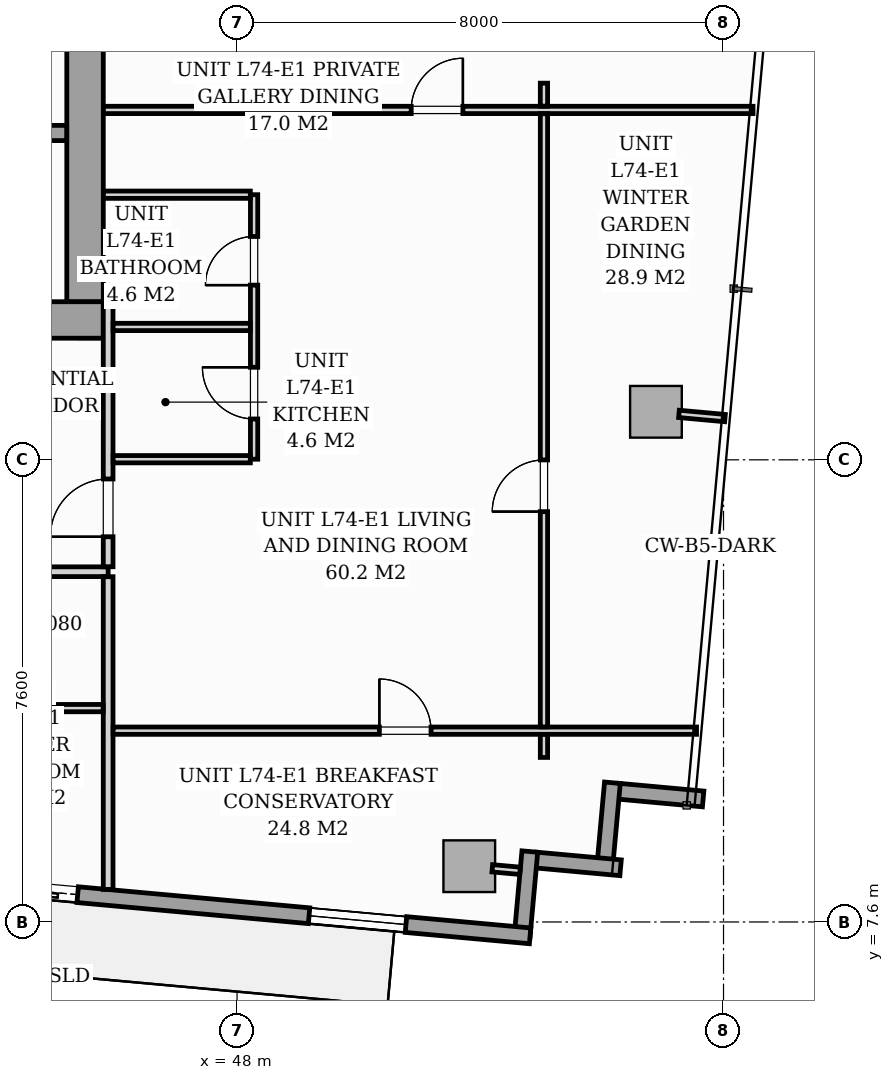
"""IFC4 building model, lengths in metres.
Left out: names, types, materials, properties, quantities, classifications, styles, units other than length and angle.
Written with IfcOpenShell. Run it as: python <this file> out.ifc"""

import sys

from ifc_helpers import new_model, si_unit, direction, frame, frame_2d, origin, origin_2d, place, context, subcontext, project, spatial, rectangle, i_section, extrude, source, transform, mapped, element, fill, save


model = new_model("IFC4")
c1 = context("Model", 3, precision=1e-05, world=origin(), true_north=direction((0.0, 1.0)))
c2 = subcontext(c1, "Body", "Model", "MODEL_VIEW")
j1 = project(units=[si_unit("LENGTHUNIT", "METRE"), si_unit("PLANEANGLEUNIT", "RADIAN")], contexts=[c1])
p1 = place(None, origin())
s1 = spatial("IfcSite", under=j1, at=p1, CompositionType="ELEMENT")
p2 = place(p1, origin())
s2 = spatial("IfcBuilding", under=s1, at=p2, CompositionType="ELEMENT")
p3 = place(p2, frame((0.0, 0.0, 256.2)))
s3 = spatial("IfcBuildingStorey", under=s2, at=p3, CompositionType="ELEMENT", Elevation=256.2)
m1 = source(origin(), c2, "Body", "SweptSolid", [
    extrude(i_section(OverallWidth=0.409, OverallDepth=0.425, WebThickness=0.033, FlangeThickness=0.052, FilletRadius=0.018, at=origin_2d()), origin(), (0.0, 0.0, 1.0), 3.296),
])
p4 = place(p3, frame((45.6, 17.4, 0.002), z_axis=(0.0, 0.0, 1.0), x_axis=(1.0, 0.0, 0.0)))
e1 = element("IfcColumn", 1, at=p4, inside=s3, PredefinedType="PILASTER", context=c2, shape_type="MappedRepresentation", body=[
    mapped(m1, transform((0.0, 0.0, 0.0), scale=1.0)),
])
m2 = source(origin(), c2, "Body", "SweptSolid", [
    extrude(rectangle(XDim=0.85, YDim=0.85, at=origin_2d()), origin(), (0.0, 0.0, 1.0), 3.294),
])
for number, where, z_axis, x_axis in (
    (2, (51.819, 8.517, 0.002), (0.0, 0.0, 1.0), (0.996, -0.091, 0.0)),
    (3, (54.889, 15.99, 0.002), (0.0, 0.0, 1.0), (0.996, -0.091, 0.0)),
):
    element("IfcColumn", number, at=place(p3, frame(where, z_axis=z_axis, x_axis=x_axis)), inside=s3, PredefinedType="COLUMN", context=c2, shape_type="MappedRepresentation", body=[
        mapped(m2, transform((0.0, 0.0, 0.0), scale=1.0)),
    ])
for number, where, z_axis, x_axis in (
    (4, (55.665, 9.623, 0.0), (0.0, 0.0, 1.0), (-0.996, 0.091, 0.0)),
    (5, (54.173, 9.889, 0.0), (0.0, 0.0, 1.0), (-0.091, -0.996, 0.0)),
):
    element("IfcWall", number, at=place(p3, frame(where, z_axis=z_axis, x_axis=x_axis)), inside=s3, PredefinedType="STANDARD", context=c2, shape_type="SweptSolid", body=[
        extrude(rectangle(XDim=1.395, YDim=0.26, at=frame_2d((0.698, 0.0))), origin(), (0.0, 0.0, 1.0), 3.0),
    ])
for number, where, z_axis, x_axis in (
    (6, (54.307, 8.492, 0.0), (0.0, 0.0, 1.0), (-0.996, 0.091, 0.0)),
    (7, (52.815, 8.758, 0.0), (0.0, 0.0, 1.0), (-0.091, -0.996, 0.0)),
):
    element("IfcWall", number, at=place(p3, frame(where, z_axis=z_axis, x_axis=x_axis)), inside=s3, PredefinedType="STANDARD", context=c2, shape_type="SweptSolid", body=[
        extrude(rectangle(XDim=1.395, YDim=0.26, at=frame_2d((0.698, 0.0))), origin(), (0.0, 0.0, 1.0), 3.0),
    ])
p5 = place(p3, frame((52.819, 7.372, 0.0), z_axis=(0.0, 0.0, 1.0), x_axis=(-0.995884447498, 0.090632043071, 0.0)))
e8 = element("IfcWall", 8, at=p5, inside=s3, PredefinedType="STANDARD", context=c2, shape_type="SweptSolid", body=[
    extrude(rectangle(XDim=14.63, YDim=0.26, at=frame_2d((7.315, 0.0))), origin(), (0.0, 0.0, 1.0), 3.0),
])
p6 = place(p5, frame((7.471, 0.0, 0.0)))
e9 = element("IfcOpeningElement", 9, at=p6, cuts=e8, PredefinedType="OPENING", context=c2, shape_type="SweptSolid", body=[
    extrude(rectangle(XDim=1.8, YDim=2.06, at=frame_2d((0.9, 1.03))), frame((0.0, 0.14, 0.0), z_axis=(0.0, -1.0, 0.0), x_axis=(1.0, 0.0, 0.0)), (0.0, 0.0, 1.0), 0.28),
])
p7 = place(p5, frame((2.05, 0.0, 0.65)))
e10 = element("IfcOpeningElement", 10, at=p7, cuts=e8, PredefinedType="OPENING", context=c2, shape_type="SweptSolid", body=[
    extrude(rectangle(XDim=1.6, YDim=1.5, at=frame_2d((0.8, 0.75))), frame((0.0, 0.14, 0.0), z_axis=(0.0, -1.0, 0.0), x_axis=(1.0, 0.0, 0.0)), (0.0, 0.0, 1.0), 0.28),
])
p8 = place(p3, frame((26.2, 17.5, 0.0), z_axis=(0.0, 0.0, 1.0), x_axis=(1.0, 0.0, 0.0)))
e11 = element("IfcWall", 11, at=p8, inside=s3, PredefinedType="SHEAR", context=c2, shape_type="SweptSolid", body=[
    extrude(rectangle(XDim=19.6, YDim=0.6, at=frame_2d((9.8, 0.0))), origin(), (0.0, 0.0, 1.0), 3.3),
])
p9 = place(p8, frame((0.95, 0.0, 0.0)))
e12 = element("IfcOpeningElement", 12, at=p9, cuts=e11, PredefinedType="OPENING", context=c2, shape_type="SweptSolid", body=[
    extrude(rectangle(XDim=0.95, YDim=2.06, at=frame_2d((0.475, 1.03))), frame((0.0, 0.31, 0.0), z_axis=(0.0, -1.0, 0.0), x_axis=(1.0, 0.0, 0.0)), (0.0, 0.0, 1.0), 0.62),
])
p10 = place(p8, frame((9.38, 0.0, 0.0)))
e13 = element("IfcOpeningElement", 13, at=p10, cuts=e11, PredefinedType="OPENING", context=c2, shape_type="SweptSolid", body=[
    extrude(rectangle(XDim=0.85, YDim=2.0, at=frame_2d((0.425, 1.0))), frame((0.0, 0.31, 0.0), z_axis=(0.0, -1.0, 0.0), x_axis=(1.0, 0.0, 0.0)), (0.0, 0.0, 1.0), 0.62),
])
p11 = place(p8, frame((17.55, 0.0, 0.0)))
e14 = element("IfcOpeningElement", 14, at=p11, cuts=e11, PredefinedType="OPENING", context=c2, shape_type="SweptSolid", body=[
    extrude(rectangle(XDim=0.95, YDim=2.06, at=frame_2d((0.475, 1.03))), frame((0.0, 0.31, 0.0), z_axis=(0.0, -1.0, 0.0), x_axis=(1.0, 0.0, 0.0)), (0.0, 0.0, 1.0), 0.62),
])
p12 = place(p3, frame((45.5, 17.802, 0.0), z_axis=(0.0, 0.0, 1.0), x_axis=(0.0, 1.0, 0.0)))
e15 = element("IfcWall", 15, at=p12, inside=s3, PredefinedType="SHEAR", context=c2, shape_type="SweptSolid", body=[
    extrude(rectangle(XDim=5.796, YDim=0.6, at=frame_2d((2.898, 0.0))), origin(), (0.0, 0.0, 1.0), 3.3),
])
p13 = place(p3, frame((37.05, 20.575, 0.0), z_axis=(0.0, 0.0, 1.0), x_axis=(1.0, 0.0, 0.0)))
e16 = element("IfcWall", 16, at=p13, inside=s3, PredefinedType="SOLIDWALL", context=c2, shape_type="SweptSolid", body=[
    extrude(rectangle(XDim=8.148, YDim=0.25, at=frame_2d((4.074, 0.0))), origin(), (0.0, 0.0, 1.0), 3.3),
])
p14 = place(p13, frame((6.6, 0.0, 0.0)))
e17 = element("IfcOpeningElement", 17, at=p14, cuts=e16, PredefinedType="OPENING", context=c2, shape_type="SweptSolid", body=[
    extrude(rectangle(XDim=0.95, YDim=2.06, at=frame_2d((0.475, 1.03))), frame((0.0, 0.135, 0.0), z_axis=(0.0, -1.0, 0.0), x_axis=(1.0, 0.0, 0.0)), (0.0, 0.0, 1.0), 0.27),
])
p15 = place(p3, frame((24.55, 13.36, 0.0), z_axis=(0.0, 0.0, 1.0), x_axis=(1.0, 0.0, 0.0)))
e18 = element("IfcWall", 18, at=p15, inside=s3, PredefinedType="PARTITIONING", context=c2, shape_type="SweptSolid", body=[
    extrude(rectangle(XDim=21.33, YDim=0.16, at=frame_2d((10.665, 0.0))), origin(), (0.0, 0.0, 1.0), 2.51),
])
p16 = place(p15, frame((5.415, 0.0, 0.0)))
e19 = element("IfcOpeningElement", 19, at=p16, cuts=e18, PredefinedType="OPENING", context=c2, shape_type="SweptSolid", body=[
    extrude(rectangle(XDim=0.95, YDim=2.06, at=frame_2d((0.475, 1.03))), frame((0.0, 0.09, 0.0), z_axis=(0.0, -1.0, 0.0), x_axis=(1.0, 0.0, 0.0)), (0.0, 0.0, 1.0), 0.18),
])
p17 = place(p3, frame((45.88, 8.136, 0.0), z_axis=(0.0, 0.0, 1.0), x_axis=(0.0, 1.0, 0.0)))
e20 = element("IfcWall", 20, at=p17, inside=s3, PredefinedType="PARTITIONING", context=c2, shape_type="SweptSolid", body=[
    extrude(rectangle(XDim=5.142, YDim=0.16, at=frame_2d((2.571, 0.0))), origin(), (0.0, 0.0, 1.0), 3.0),
])
p18 = place(p3, frame((45.88, 13.442, 0.0), z_axis=(0.0, 0.0, 1.0), x_axis=(0.0, 1.0, 0.0)))
e21 = element("IfcWall", 21, at=p18, inside=s3, PredefinedType="PARTITIONING", context=c2, shape_type="SweptSolid", body=[
    extrude(rectangle(XDim=4.36, YDim=0.16, at=frame_2d((2.18, 0.0))), origin(), (0.0, 0.0, 1.0), 3.0),
])
p19 = place(p18, frame((0.493, 0.0, 0.0)))
e22 = element("IfcOpeningElement", 22, at=p19, cuts=e21, PredefinedType="OPENING", context=c2, shape_type="SweptSolid", body=[
    extrude(rectangle(XDim=0.95, YDim=2.06, at=frame_2d((0.475, 1.03))), frame((0.0, 0.09, 0.0), z_axis=(0.0, -1.0, 0.0), x_axis=(1.0, 0.0, 0.0)), (0.0, 0.0, 1.0), 0.18),
])
p20 = place(p3, frame((40.262, 11.117, 0.0), z_axis=(0.0, 0.0, 1.0), x_axis=(1.0, 0.0, 0.0)))
e23 = element("IfcWall", 23, at=p20, inside=s3, PredefinedType="PARTITIONING", context=c2, shape_type="SweptSolid", body=[
    extrude(rectangle(XDim=5.536, YDim=0.12, at=frame_2d((2.768, 0.0))), origin(), (0.0, 0.0, 1.0), 3.0),
])
p21 = place(p20, frame((2.528, 0.0, 0.0)))
e24 = element("IfcOpeningElement", 24, at=p21, cuts=e23, PredefinedType="OPENING", context=c2, shape_type="SweptSolid", body=[
    extrude(rectangle(XDim=0.8, YDim=2.02, at=frame_2d((0.4, 1.01))), frame((0.0, 0.07, 0.0), z_axis=(0.0, -1.0, 0.0), x_axis=(1.0, 0.0, 0.0)), (0.0, 0.0, 1.0), 0.14),
])
p22 = place(p3, frame((48.28, 15.21, 0.0), z_axis=(0.0, 0.0, 1.0), x_axis=(0.0, 1.0, 0.0)))
e25 = element("IfcWall", 25, at=p22, inside=s3, PredefinedType="PARTITIONING", context=c2, shape_type="SweptSolid", body=[
    extrude(rectangle(XDim=4.35, YDim=0.12, at=frame_2d((2.175, 0.0))), origin(), (0.0, 0.0, 1.0), 3.0),
])
p23 = place(p22, frame((0.662, 0.0, 0.0)))
e26 = element("IfcOpeningElement", 26, at=p23, cuts=e25, PredefinedType="OPENING", context=c2, shape_type="SweptSolid", body=[
    extrude(rectangle(XDim=0.85, YDim=2.05, at=frame_2d((0.425, 1.025))), frame((0.0, 0.07, 0.0), z_axis=(0.0, -1.0, 0.0), x_axis=(1.0, 0.0, 0.0)), (0.0, 0.0, 1.0), 0.14),
])
p24 = place(p22, frame((2.863, 0.0, 0.0)))
e27 = element("IfcOpeningElement", 27, at=p24, cuts=e25, PredefinedType="OPENING", context=c2, shape_type="SweptSolid", body=[
    extrude(rectangle(XDim=0.8, YDim=2.02, at=frame_2d((0.4, 1.01))), frame((0.0, 0.07, 0.0), z_axis=(0.0, -1.0, 0.0), x_axis=(1.0, 0.0, 0.0)), (0.0, 0.0, 1.0), 0.14),
])
p25 = place(p3, frame((45.962, 17.385, 0.0), z_axis=(0.0, 0.0, 1.0), x_axis=(1.0, 0.0, 0.0)))
e28 = element("IfcWall", 28, at=p25, inside=s3, PredefinedType="PARTITIONING", context=c2, shape_type="SweptSolid", body=[
    extrude(rectangle(XDim=2.256, YDim=0.12, at=frame_2d((1.128, 0.0))), origin(), (0.0, 0.0, 1.0), 2.342),
])
p26 = place(p3, frame((45.962, 15.21, 0.0), z_axis=(0.0, 0.0, 1.0), x_axis=(1.0, 0.0, 0.0)))
e29 = element("IfcWall", 29, at=p26, inside=s3, PredefinedType="PARTITIONING", context=c2, shape_type="SweptSolid", body=[
    extrude(rectangle(XDim=2.256, YDim=0.12, at=frame_2d((1.128, 0.0))), origin(), (0.0, 0.0, 1.0), 3.0),
])
p27 = place(p3, frame((45.802, 19.56, 0.0), z_axis=(0.0, 0.0, 1.0), x_axis=(1.0, 0.0, 0.0)))
e30 = element("IfcWall", 30, at=p27, inside=s3, PredefinedType="PARTITIONING", context=c2, shape_type="SweptSolid", body=[
    extrude(rectangle(XDim=2.416, YDim=0.12, at=frame_2d((1.208, 0.0))), origin(), (0.0, 0.0, 1.0), 3.0),
])
p28 = place(p3, frame((45.962, 10.746, 0.0), z_axis=(0.0, 0.0, 1.0), x_axis=(1.0, 0.0, 0.0)))
e31 = element("IfcWall", 31, at=p28, inside=s3, PredefinedType="PARTITIONING", context=c2, shape_type="SweptSolid", body=[
    extrude(rectangle(XDim=9.594, YDim=0.12, at=frame_2d((4.797, 0.0))), origin(), (0.0, 0.0, 1.0), 3.0),
])
p29 = place(p28, frame((4.378, 0.0, 0.0)))
e32 = element("IfcOpeningElement", 32, at=p29, cuts=e31, PredefinedType="OPENING", context=c2, shape_type="SweptSolid", body=[
    extrude(rectangle(XDim=0.85, YDim=2.05, at=frame_2d((0.425, 1.025))), frame((0.0, 0.07, 0.0), z_axis=(0.0, -1.0, 0.0), x_axis=(1.0, 0.0, 0.0)), (0.0, 0.0, 1.0), 0.14),
])
p30 = place(p3, frame((45.802, 20.954, 0.0), z_axis=(0.0, 0.0, 1.0), x_axis=(1.0, 0.0, 0.0)))
e33 = element("IfcWall", 33, at=p30, inside=s3, PredefinedType="PARTITIONING", context=c2, shape_type="SweptSolid", body=[
    extrude(rectangle(XDim=10.683, YDim=0.12, at=frame_2d((5.342, 0.0))), origin(), (0.0, 0.0, 1.0), 3.0),
])
p31 = place(p30, frame((5.062, 0.0, 0.0)))
e34 = element("IfcOpeningElement", 34, at=p31, cuts=e33, PredefinedType="OPENING", context=c2, shape_type="SweptSolid", body=[
    extrude(rectangle(XDim=0.85, YDim=2.05, at=frame_2d((0.425, 1.025))), frame((0.0, 0.07, 0.0), z_axis=(0.0, -1.0, 0.0), x_axis=(1.0, 0.0, 0.0)), (0.0, 0.0, 1.0), 0.14),
])
p32 = place(p3, frame((53.047, 10.306, 0.0), z_axis=(0.0, 0.0, 1.0), x_axis=(0.0, 1.0, 0.0)))
e35 = element("IfcWall", 35, at=p32, inside=s3, PredefinedType="PARTITIONING", context=c2, shape_type="SweptSolid", body=[
    extrude(rectangle(XDim=0.378, YDim=0.12, at=frame_2d((0.189, 0.0))), origin(), (0.0, 0.0, 1.0), 3.0),
])
p33 = place(p3, frame((53.047, 10.808, 0.0), z_axis=(0.0, 0.0, 1.0), x_axis=(0.0, 1.0, 0.0)))
e36 = element("IfcWall", 36, at=p33, inside=s3, PredefinedType="PARTITIONING", context=c2, shape_type="SweptSolid", body=[
    extrude(rectangle(XDim=10.084, YDim=0.12, at=frame_2d((5.042, 0.0))), origin(), (0.0, 0.0, 1.0), 3.0),
])
p34 = place(p33, frame((3.54, 0.0, 0.0)))
e37 = element("IfcOpeningElement", 37, at=p34, cuts=e36, PredefinedType="OPENING", context=c2, shape_type="SweptSolid", body=[
    extrude(rectangle(XDim=0.85, YDim=2.05, at=frame_2d((0.425, 1.025))), frame((0.0, 0.07, 0.0), z_axis=(0.0, -1.0, 0.0), x_axis=(1.0, 0.0, 0.0)), (0.0, 0.0, 1.0), 0.14),
])
p35 = place(p3, frame((53.047, 21.016, 0.0), z_axis=(0.0, 0.0, 1.0), x_axis=(0.0, 1.0, 0.0)))
e38 = element("IfcWall", 38, at=p35, inside=s3, PredefinedType="PARTITIONING", context=c2, shape_type="SweptSolid", body=[
    extrude(rectangle(XDim=0.378, YDim=0.12, at=frame_2d((0.189, 0.0))), origin(), (0.0, 0.0, 1.0), 3.0),
])
p36 = place(p3, frame((52.197, 8.483, 0.0), z_axis=(0.0, 0.0, 1.0), x_axis=(0.995884462012, -0.090631883588, 0.0)))
e39 = element("IfcWall", 39, at=p36, inside=s3, PredefinedType="PARTITIONING", context=c2, shape_type="SweptSolid", body=[
    extrude(rectangle(XDim=0.458, YDim=0.12, at=frame_2d((0.229, 0.0))), origin(), (0.0, 0.0, 1.0), 3.0),
])
p37 = place(p3, frame((55.267, 15.955, 0.0), z_axis=(0.0, 0.0, 1.0), x_axis=(0.995887938321, -0.09059367697, 0.0)))
e40 = element("IfcWall", 40, at=p37, inside=s3, PredefinedType="PARTITIONING", context=c2, shape_type="SweptSolid", body=[
    extrude(rectangle(XDim=0.76, YDim=0.12, at=frame_2d((0.38, 0.0))), origin(), (0.0, 0.0, 1.0), 3.0),
])
m3 = source(origin(), c2, "Body", "SweptSolid", [
    extrude(rectangle(XDim=1.8, YDim=2.06, at=frame_2d((0.9, 1.03))), frame((0.0, 0.025, 0.0), z_axis=(0.0, -1.0, 0.0), x_axis=(1.0, 0.0, 0.0)), (0.0, 0.0, 1.0), 0.05),
])
p38 = place(p6, origin())
e41 = element("IfcDoor", 41, at=p38, inside=s3, OperationType="SLIDING_TO_RIGHT", PredefinedType="DOOR", context=c2, shape_type="MappedRepresentation", body=[
    mapped(m3, transform((0.0, 0.0, 0.0), scale=1.0)),
])
fill(e9, e41)
m4 = source(origin(), c2, "Body", "SweptSolid", [
    extrude(rectangle(XDim=1.6, YDim=1.5, at=frame_2d((0.8, 0.75))), frame((0.0, 0.03, 0.0), z_axis=(0.0, -1.0, 0.0), x_axis=(1.0, 0.0, 0.0)), (0.0, 0.0, 1.0), 0.06),
])
p39 = place(p7, origin())
e42 = element("IfcWindow", 42, at=p39, inside=s3, PartitioningType="SINGLE_PANEL", PredefinedType="WINDOW", context=c2, shape_type="MappedRepresentation", body=[
    mapped(m4, transform((0.0, 0.0, 0.0), scale=1.0)),
])
fill(e10, e42)
m5 = source(origin(), c2, "Body", "SweptSolid", [
    extrude(rectangle(XDim=0.95, YDim=2.06, at=frame_2d((0.475, 1.03))), frame((0.0, 0.025, 0.0), z_axis=(0.0, -1.0, 0.0), x_axis=(1.0, 0.0, 0.0)), (0.0, 0.0, 1.0), 0.05),
])
p40 = place(p19, origin())
e43 = element("IfcDoor", 43, at=p40, inside=s3, OperationType="SINGLE_SWING_LEFT", PredefinedType="DOOR", context=c2, shape_type="MappedRepresentation", body=[
    mapped(m5, transform((0.0, 0.0, 0.0), scale=1.0)),
])
fill(e22, e43)
m6 = source(origin(), c2, "Body", "SweptSolid", [
    extrude(rectangle(XDim=0.85, YDim=2.05, at=frame_2d((0.425, 1.025))), frame((0.0, 0.025, 0.0), z_axis=(0.0, -1.0, 0.0), x_axis=(1.0, 0.0, 0.0)), (0.0, 0.0, 1.0), 0.05),
])
p41 = place(p23, origin())
e44 = element("IfcDoor", 44, at=p41, inside=s3, OperationType="SINGLE_SWING_RIGHT", PredefinedType="DOOR", context=c2, shape_type="MappedRepresentation", body=[
    mapped(m6, transform((0.0, 0.0, 0.0), scale=1.0)),
])
fill(e26, e44)
m7 = source(origin(), c2, "Body", "SweptSolid", [
    extrude(rectangle(XDim=0.8, YDim=2.02, at=frame_2d((0.4, 1.01))), frame((0.0, 0.025, 0.0), z_axis=(0.0, -1.0, 0.0), x_axis=(1.0, 0.0, 0.0)), (0.0, 0.0, 1.0), 0.05),
])
p42 = place(p24, origin())
e45 = element("IfcDoor", 45, at=p42, inside=s3, OperationType="SINGLE_SWING_LEFT", PredefinedType="DOOR", context=c2, shape_type="MappedRepresentation", body=[
    mapped(m7, transform((0.0, 0.0, 0.0), scale=1.0)),
])
fill(e27, e45)
p43 = place(p29, origin())
e46 = element("IfcDoor", 46, at=p43, inside=s3, OperationType="SINGLE_SWING_LEFT", PredefinedType="DOOR", context=c2, shape_type="MappedRepresentation", body=[
    mapped(m6, transform((0.0, 0.0, 0.0), scale=1.0)),
])
fill(e32, e46)
p44 = place(p31, origin())
e47 = element("IfcDoor", 47, at=p44, inside=s3, OperationType="SINGLE_SWING_RIGHT", PredefinedType="DOOR", context=c2, shape_type="MappedRepresentation", body=[
    mapped(m6, transform((0.0, 0.0, 0.0), scale=1.0)),
])
fill(e34, e47)
p45 = place(p34, origin())
e48 = element("IfcDoor", 48, at=p45, inside=s3, OperationType="SINGLE_SWING_LEFT", PredefinedType="DOOR", context=c2, shape_type="MappedRepresentation", body=[
    mapped(m6, transform((0.0, 0.0, 0.0), scale=1.0)),
])
fill(e37, e48)
save(model, sys.argv[1])
